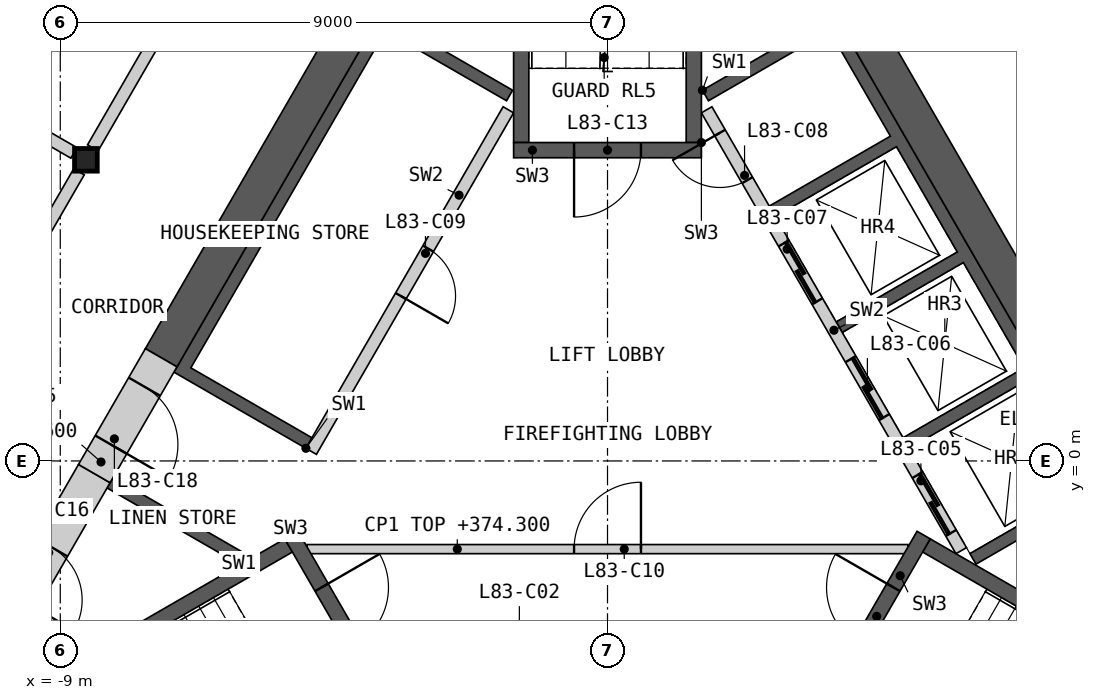
"""IFC4 building model, lengths in metres.
Left out: names, types, materials, properties, quantities, classifications, styles, units other than length and angle.
Written with IfcOpenShell. Run it as: python <this file> out.ifc"""

import sys

from ifc_helpers import new_model, si_unit, direction, frame, frame_2d, origin, origin_2d, place, context, subcontext, project, spatial, polyline, rectangle, i_section, outline, extrude, element, fill, save


model = new_model("IFC4")
c1 = context("Model", 3, precision=1e-05, world=origin(), true_north=direction((0.0, 1.0)))
c2 = subcontext(c1, "Body", "Model", "MODEL_VIEW")
j1 = project(units=[si_unit("LENGTHUNIT", "METRE"), si_unit("PLANEANGLEUNIT", "RADIAN")], contexts=[c1])
p1 = place(None, origin())
s1 = spatial("IfcSite", under=j1, at=p1, CompositionType="ELEMENT")
p2 = place(p1, origin())
s2 = spatial("IfcBuilding", under=s1, at=p2, CompositionType="ELEMENT")
p3 = place(p2, frame((0.0, 0.0, 371.2)))
s3 = spatial("IfcBuildingStorey", under=s2, at=p3, CompositionType="ELEMENT", Elevation=371.2)
p4 = place(p3, frame((-8.578, 4.953, 0.0), z_axis=(0.0, 0.0, 1.0), x_axis=(1.0, 0.0, 0.0)))
e1 = element("IfcColumn", 1, at=p4, inside=s3, PredefinedType="COLUMN", context=c2, shape_type="SweptSolid", body=[
    extrude(i_section(OverallWidth=0.374, OverallDepth=0.372, WebThickness=0.016, FlangeThickness=0.026, at=origin_2d()), origin(), (0.0, 0.0, 1.0), 3.4),
])
p5 = place(p3, origin())
e2 = element("IfcWall", 2, at=p5, inside=s3, PredefinedType="SHEAR", context=c2, shape_type="SweptSolid", body=[
    extrude(outline(polyline([(1.561, 6.097), (3.731, 7.35), (8.231, -0.444), (6.061, -1.697), (5.96, -1.524), (7.952, -0.374), (6.952, 1.358), (4.96, 0.208), (4.861, 0.381), (6.852, 1.531), (5.852, 3.263), (3.861, 2.113), (3.76, 2.287), (5.752, 3.437), (4.752, 5.169), (2.76, 4.019), (2.66, 4.192), (4.652, 5.342), (3.652, 7.074), (1.66, 5.924), (1.561, 6.097)])), origin(), (0.0, 0.0, 1.0), 3.1),
])
p6 = place(p3, frame((5.817, -1.476, 0.0), z_axis=(0.0, 0.0, 1.0), x_axis=(-0.500002616675, 0.866023893041, 0.0)))
e3 = element("IfcWall", 3, at=p6, inside=s3, PredefinedType="SOLIDWALL", context=c2, shape_type="SweptSolid", body=[
    extrude(rectangle(XDim=8.373, YDim=0.2, at=frame_2d((4.187, 0.0))), origin(), (0.0, 0.0, 1.0), 3.1),
])
p7 = place(p6, frame((0.337, 0.0, 0.0)))
e4 = element("IfcOpeningElement", 4, at=p7, cuts=e3, PredefinedType="OPENING", context=c2, shape_type="SweptSolid", body=[
    extrude(rectangle(XDim=1.1, YDim=2.1, at=frame_2d((0.55, 1.05))), frame((0.0, 0.11, 0.0), z_axis=(0.0, -1.0, 0.0), x_axis=(1.0, 0.0, 0.0)), (0.0, 0.0, 1.0), 0.22),
])
p8 = place(p6, frame((2.537, 0.0, 0.0)))
e5 = element("IfcOpeningElement", 5, at=p8, cuts=e3, PredefinedType="OPENING", context=c2, shape_type="SweptSolid", body=[
    extrude(rectangle(XDim=1.1, YDim=2.1, at=frame_2d((0.55, 1.05))), frame((0.0, 0.11, 0.0), z_axis=(0.0, -1.0, 0.0), x_axis=(1.0, 0.0, 0.0)), (0.0, 0.0, 1.0), 0.22),
])
p9 = place(p6, frame((4.737, 0.0, 0.0)))
e6 = element("IfcOpeningElement", 6, at=p9, cuts=e3, PredefinedType="OPENING", context=c2, shape_type="SweptSolid", body=[
    extrude(rectangle(XDim=1.1, YDim=2.1, at=frame_2d((0.55, 1.05))), frame((0.0, 0.11, 0.0), z_axis=(0.0, -1.0, 0.0), x_axis=(1.0, 0.0, 0.0)), (0.0, 0.0, 1.0), 0.22),
])
p10 = place(p6, frame((7.037, 0.0, 0.0)))
e7 = element("IfcOpeningElement", 7, at=p10, cuts=e3, PredefinedType="OPENING", context=c2, shape_type="SweptSolid", body=[
    extrude(rectangle(XDim=0.9, YDim=2.1, at=frame_2d((0.45, 1.05))), frame((0.0, 0.11, 0.0), z_axis=(0.0, -1.0, 0.0), x_axis=(1.0, 0.0, 0.0)), (0.0, 0.0, 1.0), 0.22),
])
p11 = place(p3, origin())
e8 = element("IfcWall", 8, at=p11, inside=s3, PredefinedType="SHEAR", context=c2, shape_type="SweptSolid", body=[
    extrude(outline(polyline([(-6.061, -1.697), (-8.231, -0.444), (-8.131, -0.271), (-5.96, -1.524), (-6.061, -1.697)])), origin(), (0.0, 0.0, 1.0), 3.1),
])
p12 = place(p3, origin())
e9 = element("IfcWall", 9, at=p12, inside=s3, PredefinedType="SHEAR", context=c2, shape_type="SweptSolid", body=[
    extrude(outline(polyline([(-4.96, 0.208), (-7.131, 1.461), (-3.731, 7.35), (-1.561, 6.097), (-1.66, 5.924), (-3.652, 7.074), (-6.852, 1.531), (-4.861, 0.381), (-4.96, 0.208)])), origin(), (0.0, 0.0, 1.0), 3.1),
])
p13 = place(p3, frame((-1.631, 5.776, 0.0), z_axis=(0.0, 0.0, 1.0), x_axis=(-0.499992876559, -0.866029516466, 0.0)))
e10 = element("IfcWall", 10, at=p13, inside=s3, PredefinedType="SOLIDWALL", context=c2, shape_type="SweptSolid", body=[
    extrude(rectangle(XDim=6.486, YDim=0.2, at=frame_2d((3.243, 0.0))), origin(), (0.0, 0.0, 1.0), 3.1),
])
p14 = place(p13, frame((2.637, 0.0, 0.0)))
e11 = element("IfcOpeningElement", 11, at=p14, cuts=e10, PredefinedType="OPENING", context=c2, shape_type="SweptSolid", body=[
    extrude(rectangle(XDim=0.9, YDim=2.1, at=frame_2d((0.45, 1.05))), frame((0.0, 0.11, 0.0), z_axis=(0.0, -1.0, 0.0), x_axis=(1.0, 0.0, 0.0)), (0.0, 0.0, 1.0), 0.22),
])
p15 = place(p3, frame((-4.941, -1.45, 0.0), z_axis=(0.0, 0.0, 1.0), x_axis=(1.0, 0.0, 0.0)))
e12 = element("IfcWall", 12, at=p15, inside=s3, PredefinedType="PARTITIONING", context=c2, shape_type="SweptSolid", body=[
    extrude(rectangle(XDim=9.882, YDim=0.15, at=frame_2d((4.941, 0.0))), origin(), (0.0, 0.0, 1.0), 3.1),
])
p16 = place(p15, frame((4.391, 0.0, 0.0)))
e13 = element("IfcOpeningElement", 13, at=p16, cuts=e12, PredefinedType="OPENING", context=c2, shape_type="SweptSolid", body=[
    extrude(rectangle(XDim=1.1, YDim=2.1, at=frame_2d((0.55, 1.05))), frame((0.0, 0.085, 0.0), z_axis=(0.0, -1.0, 0.0), x_axis=(1.0, 0.0, 0.0)), (0.0, 0.0, 1.0), 0.17),
])
p17 = place(p3, origin())
e14 = element("IfcWall", 14, at=p17, inside=s3, PredefinedType="SHEAR", context=c2, shape_type="SweptSolid", body=[
    extrude(outline(polyline([(-5.307, -1.281), (-10.374, -4.206), (-10.032, -4.298), (-5.182, -1.498), (-5.307, -1.281)])), origin(), (0.0, 0.0, 1.0), 3.1),
])
p18 = place(p3, frame((-5.199, -1.219, 0.0), z_axis=(0.0, 0.0, 1.0), x_axis=(0.499982516597, -0.866035497597, 0.0)))
e15 = element("IfcWall", 15, at=p18, inside=s3, PredefinedType="SHEAR", context=c2, shape_type="SweptSolid", body=[
    extrude(rectangle(XDim=3.088, YDim=0.25, at=frame_2d((1.544, 0.0))), origin(), (0.0, 0.0, 1.0), 3.1),
])
p19 = place(p18, frame((0.994, 0.0, 0.0)))
e16 = element("IfcOpeningElement", 16, at=p19, cuts=e15, PredefinedType="OPENING", context=c2, shape_type="SweptSolid", body=[
    extrude(rectangle(XDim=1.1, YDim=2.1, at=frame_2d((0.55, 1.05))), frame((0.0, 0.135, 0.0), z_axis=(0.0, -1.0, 0.0), x_axis=(1.0, 0.0, 0.0)), (0.0, 0.0, 1.0), 0.27),
])
p20 = place(p3, origin())
e17 = element("IfcWall", 17, at=p20, inside=s3, PredefinedType="SHEAR", context=c2, shape_type="SweptSolid", body=[
    extrude(outline(polyline([(10.032, -4.298), (10.374, -4.206), (5.307, -1.281), (5.182, -1.498), (10.032, -4.298)])), origin(), (0.0, 0.0, 1.0), 3.1),
])
p21 = place(p3, frame((3.655, -3.893, 0.0), z_axis=(0.0, 0.0, 1.0), x_axis=(0.499982516597, 0.866035497597, 0.0)))
e18 = element("IfcWall", 18, at=p21, inside=s3, PredefinedType="SHEAR", context=c2, shape_type="SweptSolid", body=[
    extrude(rectangle(XDim=3.088, YDim=0.25, at=frame_2d((1.544, 0.0))), origin(), (0.0, 0.0, 1.0), 3.1),
])
p22 = place(p21, frame((0.994, 0.0, 0.0)))
e19 = element("IfcOpeningElement", 19, at=p22, cuts=e18, PredefinedType="OPENING", context=c2, shape_type="SweptSolid", body=[
    extrude(rectangle(XDim=1.1, YDim=2.1, at=frame_2d((0.55, 1.05))), frame((0.0, 0.135, 0.0), z_axis=(0.0, -1.0, 0.0), x_axis=(1.0, 0.0, 0.0)), (0.0, 0.0, 1.0), 0.27),
])
p23 = place(p3, origin())
e20 = element("IfcWall", 20, at=p23, inside=s3, PredefinedType="SHEAR", context=c2, shape_type="SweptSolid", body=[
    extrude(outline(polyline([(1.544, 5.237), (1.544, 11.087), (1.294, 10.837), (1.294, 5.237), (1.544, 5.237)])), origin(), (0.0, 0.0, 1.0), 3.1),
])
p24 = place(p3, origin())
e21 = element("IfcWall", 21, at=p24, inside=s3, PredefinedType="SHEAR", context=c2, shape_type="SweptSolid", body=[
    extrude(outline(polyline([(-1.294, 10.837), (-1.544, 11.087), (-1.544, 5.237), (-1.294, 5.237), (-1.294, 10.837)])), origin(), (0.0, 0.0, 1.0), 3.1),
])
p25 = place(p3, frame((1.544, 5.112, 0.0), z_axis=(0.0, 0.0, 1.0), x_axis=(-1.0, 0.0, 0.0)))
e22 = element("IfcWall", 22, at=p25, inside=s3, PredefinedType="SHEAR", context=c2, shape_type="SweptSolid", body=[
    extrude(rectangle(XDim=3.088, YDim=0.25, at=frame_2d((1.544, 0.0))), origin(), (0.0, 0.0, 1.0), 3.1),
])
p26 = place(p25, frame((0.994, 0.0, 0.0)))
e23 = element("IfcOpeningElement", 23, at=p26, cuts=e22, PredefinedType="OPENING", context=c2, shape_type="SweptSolid", body=[
    extrude(rectangle(XDim=1.1, YDim=2.1, at=frame_2d((0.55, 1.05))), frame((0.0, 0.135, 0.0), z_axis=(0.0, -1.0, 0.0), x_axis=(1.0, 0.0, 0.0)), (0.0, 0.0, 1.0), 0.27),
])
p27 = place(p3, frame((8.686, -0.634, 0.0), z_axis=(0.0, 0.0, 1.0), x_axis=(-0.500004601921, 0.866022746848, 0.0)))
e24 = element("IfcWall", 24, at=p27, inside=s3, PredefinedType="SHEAR", context=c2, shape_type="SweptSolid", body=[
    extrude(rectangle(XDim=16.853, YDim=0.6, at=frame_2d((8.426, 0.0))), origin(), (0.0, 0.0, 1.0), 3.1),
])
p28 = place(p3, frame((-3.794, 7.84, 0.0), z_axis=(0.0, 0.0, 1.0), x_axis=(-0.499974747889, -0.866039982607, 0.0)))
e25 = element("IfcWall", 25, at=p28, inside=s3, PredefinedType="SHEAR", context=c2, shape_type="SweptSolid", body=[
    extrude(rectangle(XDim=7.092, YDim=0.6, at=frame_2d((3.546, 0.0))), origin(), (0.0, 0.0, 1.0), 3.1),
])
p29 = place(p3, frame((-8.44, -0.208, 0.0), z_axis=(0.0, 0.0, 1.0), x_axis=(-0.499997052475, -0.866027105532, 0.0)))
e26 = element("IfcWall", 26, at=p29, inside=s3, PredefinedType="SHEAR", context=c2, shape_type="SweptSolid", body=[
    extrude(rectangle(XDim=3.001, YDim=0.6, at=frame_2d((1.501, 0.0))), origin(), (0.0, 0.0, 1.0), 3.1),
])
p30 = place(p29, frame((1.4, 0.0, 0.0)))
e27 = element("IfcOpeningElement", 27, at=p30, cuts=e26, PredefinedType="OPENING", context=c2, shape_type="SweptSolid", body=[
    extrude(rectangle(XDim=1.0, YDim=2.1, at=frame_2d((0.5, 1.05))), frame((0.0, 0.31, 0.0), z_axis=(0.0, -1.0, 0.0), x_axis=(1.0, 0.0, 0.0)), (0.0, 0.0, 1.0), 0.62),
])
p31 = place(p3, frame((-7.34, 1.698, 0.0), z_axis=(0.0, 0.0, 1.0), x_axis=(-0.50002983664, -0.866008176907, 0.0)))
e28 = element("IfcWall", 28, at=p31, inside=s3, PredefinedType="SHEAR", context=c2, shape_type="SweptSolid", body=[
    extrude(rectangle(XDim=2.2, YDim=0.6, at=frame_2d((1.1, 0.0))), origin(), (0.0, 0.0, 1.0), 3.1),
])
p32 = place(p31, frame((0.55, 0.0, 0.0)))
e29 = element("IfcOpeningElement", 29, at=p32, cuts=e28, PredefinedType="OPENING", context=c2, shape_type="SweptSolid", body=[
    extrude(rectangle(XDim=1.1, YDim=2.1, at=frame_2d((0.55, 1.05))), frame((0.0, 0.31, 0.0), z_axis=(0.0, -1.0, 0.0), x_axis=(1.0, 0.0, 0.0)), (0.0, 0.0, 1.0), 0.62),
])
p33 = place(p3, frame((4.403, 12.185, 0.0), z_axis=(0.0, 0.0, 1.0), x_axis=(0.499992155518, -0.866029932751, 0.0)))
e30 = element("IfcWall", 30, at=p33, inside=s3, PredefinedType="PARTITIONING", context=c2, shape_type="SweptSolid", body=[
    extrude(rectangle(XDim=8.123, YDim=0.2, at=frame_2d((4.062, 0.0))), origin(), (0.0, 0.0, 1.0), 3.1),
])
p34 = place(p33, frame((3.963, 0.0, 0.0)))
e31 = element("IfcOpeningElement", 31, at=p34, cuts=e30, PredefinedType="OPENING", context=c2, shape_type="SweptSolid", body=[
    extrude(rectangle(XDim=1.0, YDim=2.1, at=frame_2d((0.5, 1.05))), frame((0.0, 0.11, 0.0), z_axis=(0.0, -1.0, 0.0), x_axis=(1.0, 0.0, 0.0)), (0.0, 0.0, 1.0), 0.22),
])
p35 = place(p3, frame((-8.465, 5.15, 0.0), z_axis=(0.0, 0.0, 1.0), x_axis=(0.499992155518, 0.866029932751, 0.0)))
e32 = element("IfcWall", 32, at=p35, inside=s3, PredefinedType="PARTITIONING", context=c2, shape_type="SweptSolid", body=[
    extrude(rectangle(XDim=8.123, YDim=0.2, at=frame_2d((4.062, 0.0))), origin(), (0.0, 0.0, 1.0), 3.1),
])
p36 = place(p35, frame((3.587, 0.0, 0.0)))
e33 = element("IfcOpeningElement", 33, at=p36, cuts=e32, PredefinedType="OPENING", context=c2, shape_type="SweptSolid", body=[
    extrude(rectangle(XDim=0.95, YDim=2.1, at=frame_2d((0.475, 1.05))), frame((0.0, 0.11, 0.0), z_axis=(0.0, -1.0, 0.0), x_axis=(1.0, 0.0, 0.0)), (0.0, 0.0, 1.0), 0.22),
])
p37 = place(p3, frame((-12.754, -2.279, 0.0), z_axis=(0.0, 0.0, 1.0), x_axis=(0.500001682468, 0.866024432409, 0.0)))
e34 = element("IfcWall", 34, at=p37, inside=s3, PredefinedType="PARTITIONING", context=c2, shape_type="SweptSolid", body=[
    extrude(rectangle(XDim=8.124, YDim=0.2, at=frame_2d((4.062, 0.0))), origin(), (0.0, 0.0, 1.0), 3.1),
])
p38 = place(p37, frame((3.762, 0.0, 0.0)))
e35 = element("IfcOpeningElement", 35, at=p38, cuts=e34, PredefinedType="OPENING", context=c2, shape_type="SweptSolid", body=[
    extrude(rectangle(XDim=1.0, YDim=2.1, at=frame_2d((0.5, 1.05))), frame((0.0, 0.11, 0.0), z_axis=(0.0, -1.0, 0.0), x_axis=(1.0, 0.0, 0.0)), (0.0, 0.0, 1.0), 0.22),
])
p39 = place(p3, frame((-11.473, 6.74, 0.0), z_axis=(0.0, 0.0, 1.0), x_axis=(0.500001082559, 0.866024778768, 0.0)))
e36 = element("IfcWall", 36, at=p39, inside=s3, PredefinedType="PARTITIONING", context=c2, shape_type="SweptSolid", body=[
    extrude(rectangle(XDim=15.094, YDim=0.2, at=frame_2d((7.547, 0.0))), origin(), (0.0, 0.0, 1.0), 2.33),
])
p40 = place(p39, frame((10.383, 0.0, 0.0)))
e37 = element("IfcOpeningElement", 37, at=p40, cuts=e36, PredefinedType="OPENING", context=c2, shape_type="SweptSolid", body=[
    extrude(rectangle(XDim=0.95, YDim=2.1, at=frame_2d((0.475, 1.05))), frame((0.0, 0.11, 0.0), z_axis=(0.0, -1.0, 0.0), x_axis=(1.0, 0.0, 0.0)), (0.0, 0.0, 1.0), 0.22),
])
p41 = place(p3, frame((-18.869, 10.894, 0.0), z_axis=(0.0, 0.0, 1.0), x_axis=(0.866023724155, -0.500002909193, 0.0)))
e38 = element("IfcWall", 38, at=p41, inside=s3, PredefinedType="PARTITIONING", context=c2, shape_type="SweptSolid", body=[
    extrude(rectangle(XDim=11.655, YDim=0.2, at=frame_2d((5.827, 0.0))), origin(), (0.0, 0.0, 1.0), 2.33),
])
p42 = place(p7, origin())
e39 = element("IfcDoor", 39, at=p42, inside=s3, OperationType="SLIDING_TO_LEFT", PredefinedType="DOOR", context=c2, shape_type="SweptSolid", body=[
    extrude(rectangle(XDim=1.1, YDim=2.1, at=frame_2d((0.55, 1.05))), frame((0.0, 0.025, 0.0), z_axis=(0.0, -1.0, 0.0), x_axis=(1.0, 0.0, 0.0)), (0.0, 0.0, 1.0), 0.05),
])
fill(e4, e39)
p43 = place(p8, origin())
e40 = element("IfcDoor", 40, at=p43, inside=s3, OperationType="SLIDING_TO_LEFT", PredefinedType="DOOR", context=c2, shape_type="SweptSolid", body=[
    extrude(rectangle(XDim=1.1, YDim=2.1, at=frame_2d((0.55, 1.05))), frame((0.0, 0.025, 0.0), z_axis=(0.0, -1.0, 0.0), x_axis=(1.0, 0.0, 0.0)), (0.0, 0.0, 1.0), 0.05),
])
fill(e5, e40)
p44 = place(p9, origin())
e41 = element("IfcDoor", 41, at=p44, inside=s3, OperationType="SLIDING_TO_LEFT", PredefinedType="DOOR", context=c2, shape_type="SweptSolid", body=[
    extrude(rectangle(XDim=1.1, YDim=2.1, at=frame_2d((0.55, 1.05))), frame((0.0, 0.025, 0.0), z_axis=(0.0, -1.0, 0.0), x_axis=(1.0, 0.0, 0.0)), (0.0, 0.0, 1.0), 0.05),
])
fill(e6, e41)
p45 = place(p10, origin())
e42 = element("IfcDoor", 42, at=p45, inside=s3, OperationType="SINGLE_SWING_RIGHT", PredefinedType="DOOR", context=c2, shape_type="SweptSolid", body=[
    extrude(rectangle(XDim=0.9, YDim=2.1, at=frame_2d((0.45, 1.05))), frame((0.0, 0.025, 0.0), z_axis=(0.0, -1.0, 0.0), x_axis=(1.0, 0.0, 0.0)), (0.0, 0.0, 1.0), 0.05),
])
fill(e7, e42)
p46 = place(p14, origin())
e43 = element("IfcDoor", 43, at=p46, inside=s3, OperationType="SINGLE_SWING_RIGHT", PredefinedType="DOOR", context=c2, shape_type="SweptSolid", body=[
    extrude(rectangle(XDim=0.9, YDim=2.1, at=frame_2d((0.45, 1.05))), frame((0.0, 0.025, 0.0), z_axis=(0.0, -1.0, 0.0), x_axis=(1.0, 0.0, 0.0)), (0.0, 0.0, 1.0), 0.05),
])
fill(e11, e43)
p47 = place(p16, origin())
e44 = element("IfcDoor", 44, at=p47, inside=s3, OperationType="SINGLE_SWING_RIGHT", PredefinedType="DOOR", context=c2, shape_type="SweptSolid", body=[
    extrude(rectangle(XDim=1.1, YDim=2.1, at=frame_2d((0.55, 1.05))), frame((0.0, 0.025, 0.0), z_axis=(0.0, -1.0, 0.0), x_axis=(1.0, 0.0, 0.0)), (0.0, 0.0, 1.0), 0.05),
])
fill(e13, e44)
p48 = place(p19, origin())
e45 = element("IfcDoor", 45, at=p48, inside=s3, OperationType="SINGLE_SWING_LEFT", PredefinedType="DOOR", context=c2, shape_type="SweptSolid", body=[
    extrude(rectangle(XDim=1.1, YDim=2.1, at=frame_2d((0.55, 1.05))), frame((0.0, 0.025, 0.0), z_axis=(0.0, -1.0, 0.0), x_axis=(1.0, 0.0, 0.0)), (0.0, 0.0, 1.0), 0.05),
])
fill(e16, e45)
p49 = place(p22, origin())
e46 = element("IfcDoor", 46, at=p49, inside=s3, OperationType="SINGLE_SWING_RIGHT", PredefinedType="DOOR", context=c2, shape_type="SweptSolid", body=[
    extrude(rectangle(XDim=1.1, YDim=2.1, at=frame_2d((0.55, 1.05))), frame((0.0, 0.025, 0.0), z_axis=(0.0, -1.0, 0.0), x_axis=(1.0, 0.0, 0.0)), (0.0, 0.0, 1.0), 0.05),
])
fill(e19, e46)
p50 = place(p26, origin())
e47 = element("IfcDoor", 47, at=p50, inside=s3, OperationType="SINGLE_SWING_RIGHT", PredefinedType="DOOR", context=c2, shape_type="SweptSolid", body=[
    extrude(rectangle(XDim=1.1, YDim=2.1, at=frame_2d((0.55, 1.05))), frame((0.0, 0.025, 0.0), z_axis=(0.0, -1.0, 0.0), x_axis=(1.0, 0.0, 0.0)), (0.0, 0.0, 1.0), 0.05),
])
fill(e23, e47)
p51 = place(p30, origin())
e48 = element("IfcDoor", 48, at=p51, inside=s3, OperationType="SINGLE_SWING_RIGHT", PredefinedType="DOOR", context=c2, shape_type="SweptSolid", body=[
    extrude(rectangle(XDim=1.0, YDim=2.1, at=frame_2d((0.5, 1.05))), frame((0.0, 0.055, 0.0), z_axis=(0.0, -1.0, 0.0), x_axis=(1.0, 0.0, 0.0)), (0.0, 0.0, 1.0), 0.05),
])
fill(e27, e48)
p52 = place(p32, origin())
e49 = element("IfcDoor", 49, at=p52, inside=s3, OperationType="SINGLE_SWING_RIGHT", PredefinedType="DOOR", context=c2, shape_type="SweptSolid", body=[
    extrude(rectangle(XDim=1.1, YDim=2.1, at=frame_2d((0.55, 1.05))), frame((0.0, 0.055, 0.0), z_axis=(0.0, -1.0, 0.0), x_axis=(1.0, 0.0, 0.0)), (0.0, 0.0, 1.0), 0.05),
])
fill(e29, e49)
save(model, sys.argv[1])
